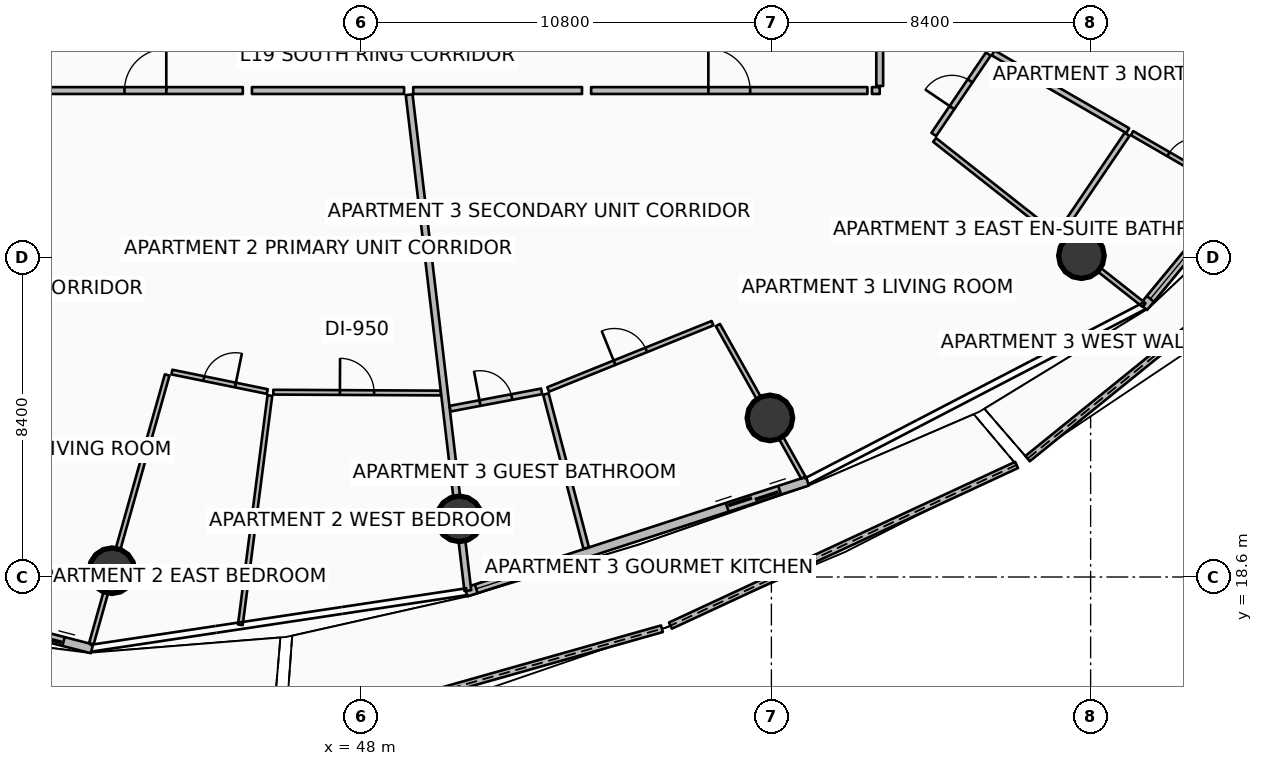
"""IFC4 building model, lengths in metres.
Left out: names, types, materials, properties, quantities, classifications, styles, units other than length and angle.
Written with IfcOpenShell. Run it as: python <this file> out.ifc"""

import sys

from ifc_helpers import new_model, si_unit, direction, frame, frame_2d, origin, origin_2d, place, context, subcontext, project, spatial, polyline, rectangle, circle, outline, extrude, element, fill, save


model = new_model("IFC4")
c1 = context("Model", 3, precision=1e-05, world=origin(), true_north=direction((0.0, 1.0)))
c2 = subcontext(c1, "Body", "Model", "MODEL_VIEW")
j1 = project(units=[si_unit("LENGTHUNIT", "METRE"), si_unit("PLANEANGLEUNIT", "RADIAN")], contexts=[c1])
p1 = place(None, origin())
s1 = spatial("IfcSite", under=j1, at=p1, CompositionType="ELEMENT")
p2 = place(p1, origin())
s2 = spatial("IfcBuilding", under=s1, at=p2, CompositionType="ELEMENT")
p3 = place(p2, frame((0.0, 0.0, 78.9)))
s3 = spatial("IfcBuildingStorey", under=s2, at=p3, CompositionType="ELEMENT", Elevation=78.9)
for number, where, z_axis, x_axis in (
    (1, (41.447, 18.766, 0.0), (0.0, 0.0, 1.0), (1.0, 0.0, 0.0)),
    (2, (50.588, 20.131, 0.0), (0.0, 0.0, 1.0), (1.0, 0.0, 0.0)),
    (3, (58.76, 22.786, 0.0), (0.0, 0.0, 1.0), (1.0, 0.0, 0.0)),
    (4, (66.958, 27.055, 0.0), (0.0, 0.0, 1.0), (1.0, 0.0, 0.0)),
):
    element("IfcColumn", number, at=place(p3, frame(where, z_axis=z_axis, x_axis=x_axis)), inside=s3, PredefinedType="COLUMN", context=c2, shape_type="SweptSolid", body=[
        extrude(circle(Radius=0.6, at=origin_2d()), origin(), (0.0, 0.0, 1.0), 3.5),
    ])
p4 = place(p3, frame((46.0, 14.436, 0.0), z_axis=(0.0, 0.0, 1.0), x_axis=(0.962322473133, 0.271910753195, 0.0)))
e5 = element("IfcWall", 5, at=p4, inside=s3, PredefinedType="PARAPET", context=c2, shape_type="SweptSolid", body=[
    extrude(outline(polyline([(0.0, 0.0), (10.308, 0.0), (10.308, 1.632), (5.154, 1.798), (0.0, 1.86), (0.0, 0.0)])), frame((0.0, 0.09, 0.0), z_axis=(0.0, -1.0, 0.0), x_axis=(1.0, 0.0, 0.0)), (0.0, 0.0, 1.0), 0.18),
])
p5 = place(p3, frame((56.144, 17.322, 0.0), z_axis=(0.0, 0.0, 1.0), x_axis=(0.907065674135, 0.420989148086, 0.0)))
e6 = element("IfcWall", 6, at=p5, inside=s3, PredefinedType="PARAPET", context=c2, shape_type="SweptSolid", body=[
    extrude(outline(polyline([(0.0, 0.0), (10.041, 0.0), (10.042, 1.233), (5.021, 1.418), (0.0, 1.632), (0.0, 0.0)])), frame((0.0, 0.09, 0.0), z_axis=(0.0, -1.0, 0.0), x_axis=(1.0, 0.0, 0.0)), (0.0, 0.0, 1.0), 0.18),
])
p6 = place(p3, frame((65.541, 21.715, 0.0), z_axis=(0.0, 0.0, 1.0), x_axis=(0.777242274281, 0.629201436005, 0.0)))
e7 = element("IfcWall", 7, at=p6, inside=s3, PredefinedType="PARAPET", context=c2, shape_type="SweptSolid", body=[
    extrude(outline(polyline([(0.0, 0.0), (10.949, 0.0), (10.949, 1.148), (5.474, 1.127), (0.0, 1.224), (0.0, 0.0)])), frame((0.0, 0.09, 0.0), z_axis=(0.0, -1.0, 0.0), x_axis=(1.0, 0.0, 0.0)), (0.0, 0.0, 1.0), 0.18),
])
p7 = place(p3, frame((30.186, 19.477, 0.0), z_axis=(0.0, 0.0, 1.0), x_axis=(0.968356180858, -0.249572248045, 0.0)))
e8 = element("IfcWall", 8, at=p7, inside=s3, PredefinedType="SOLIDWALL", context=c2, shape_type="SweptSolid", body=[
    extrude(rectangle(XDim=11.084, YDim=0.24, at=frame_2d((5.542, 0.0))), origin(), (0.0, 0.0, 1.0), 2.45),
])
p8 = place(p7, frame((8.865, 0.0, 0.0)))
e9 = element("IfcOpeningElement", 9, at=p8, cuts=e8, PredefinedType="OPENING", context=c2, shape_type="SweptSolid", body=[
    extrude(rectangle(XDim=1.45, YDim=2.15, at=frame_2d((0.725, 1.075))), frame((0.0, 0.13, 0.0), z_axis=(0.0, -1.0, 0.0), x_axis=(1.0, 0.0, 0.0)), (0.0, 0.0, 1.0), 0.26),
])
p9 = place(p7, frame((0.28, 0.0, 0.65)))
e10 = element("IfcOpeningElement", 10, at=p9, cuts=e8, PredefinedType="OPENING", context=c2, shape_type="SweptSolid", body=[
    extrude(rectangle(XDim=1.6, YDim=1.5, at=frame_2d((0.8, 0.75))), frame((0.0, 0.13, 0.0), z_axis=(0.0, -1.0, 0.0), x_axis=(1.0, 0.0, 0.0)), (0.0, 0.0, 1.0), 0.26),
])
p10 = place(p3, frame((50.767, 18.203, 0.0), z_axis=(0.0, 0.0, 1.0), x_axis=(0.951052494852, 0.30902937083, 0.0)))
e11 = element("IfcWall", 11, at=p10, inside=s3, PredefinedType="SOLIDWALL", context=c2, shape_type="SweptSolid", body=[
    extrude(rectangle(XDim=9.444, YDim=0.24, at=frame_2d((4.722, 0.0))), origin(), (0.0, 0.0, 1.0), 2.45),
])
p11 = place(p10, frame((7.224, 0.0, 0.0)))
e12 = element("IfcOpeningElement", 12, at=p11, cuts=e11, PredefinedType="OPENING", context=c2, shape_type="SweptSolid", body=[
    extrude(rectangle(XDim=1.45, YDim=2.15, at=frame_2d((0.725, 1.075))), frame((0.0, 0.13, 0.0), z_axis=(0.0, -1.0, 0.0), x_axis=(1.0, 0.0, 0.0)), (0.0, 0.0, 1.0), 0.26),
])
p12 = place(p10, frame((0.28, 0.0, 0.65)))
e13 = element("IfcOpeningElement", 13, at=p12, cuts=e11, PredefinedType="OPENING", context=c2, shape_type="SweptSolid", body=[
    extrude(rectangle(XDim=1.6, YDim=1.5, at=frame_2d((0.8, 0.75))), frame((0.0, 0.13, 0.0), z_axis=(0.0, -1.0, 0.0), x_axis=(1.0, 0.0, 0.0)), (0.0, 0.0, 1.0), 0.26),
])
p13 = place(p3, frame((68.593, 25.702, 0.0), z_axis=(0.0, 0.0, 1.0), x_axis=(0.636704975, 0.771107498868, 0.0)))
e14 = element("IfcWall", 14, at=p13, inside=s3, PredefinedType="SOLIDWALL", context=c2, shape_type="SweptSolid", body=[
    extrude(rectangle(XDim=11.084, YDim=0.24, at=frame_2d((5.542, 0.0))), origin(), (0.0, 0.0, 1.0), 2.45),
])
p14 = place(p13, frame((8.864, 0.0, 0.0)))
e15 = element("IfcOpeningElement", 15, at=p14, cuts=e14, PredefinedType="OPENING", context=c2, shape_type="SweptSolid", body=[
    extrude(rectangle(XDim=1.45, YDim=2.15, at=frame_2d((0.725, 1.075))), frame((0.0, 0.13, 0.0), z_axis=(0.0, -1.0, 0.0), x_axis=(1.0, 0.0, 0.0)), (0.0, 0.0, 1.0), 0.26),
])
p15 = place(p13, frame((0.28, 0.0, 0.65)))
e16 = element("IfcOpeningElement", 16, at=p15, cuts=e14, PredefinedType="OPENING", context=c2, shape_type="SweptSolid", body=[
    extrude(rectangle(XDim=1.6, YDim=1.5, at=frame_2d((0.8, 0.75))), frame((0.0, 0.13, 0.0), z_axis=(0.0, -1.0, 0.0), x_axis=(1.0, 0.0, 0.0)), (0.0, 0.0, 1.0), 0.26),
])
p16 = place(p3, frame((49.268, 31.291, 0.0), z_axis=(0.0, 0.0, 1.0), x_axis=(0.117532311618, -0.993069058891, 0.0)))
e17 = element("IfcWall", 17, at=p16, inside=s3, PredefinedType="PARTITIONING", context=c2, shape_type="SweptSolid", body=[
    extrude(rectangle(XDim=13.138, YDim=0.18, at=frame_2d((6.569, 0.0))), origin(), (0.0, 0.0, 1.0), 2.94),
])
p17 = place(p3, frame((39.764, 31.4, 0.0), z_axis=(0.0, 0.0, 1.0), x_axis=(1.0, 0.0, 0.0)))
e18 = element("IfcWall", 18, at=p17, inside=s3, PredefinedType="PARTITIONING", context=c2, shape_type="SweptSolid", body=[
    extrude(rectangle(XDim=5.127, YDim=0.18, at=frame_2d((2.563, 0.0))), origin(), (0.0, 0.0, 1.0), 2.94),
])
p18 = place(p17, frame((2.013, 0.0, 0.0)))
e19 = element("IfcOpeningElement", 19, at=p18, cuts=e18, PredefinedType="OPENING", context=c2, shape_type="SweptSolid", body=[
    extrude(rectangle(XDim=1.1, YDim=2.1, at=frame_2d((0.55, 1.05))), frame((0.0, 0.1, 0.0), z_axis=(0.0, -1.0, 0.0), x_axis=(1.0, 0.0, 0.0)), (0.0, 0.0, 1.0), 0.2),
])
p19 = place(p3, frame((45.131, 31.4, 0.0), z_axis=(0.0, 0.0, 1.0), x_axis=(1.0, 0.0, 0.0)))
e20 = element("IfcWall", 20, at=p19, inside=s3, PredefinedType="PARTITIONING", context=c2, shape_type="SweptSolid", body=[
    extrude(rectangle(XDim=4.004, YDim=0.18, at=frame_2d((2.002, 0.0))), origin(), (0.0, 0.0, 1.0), 2.94),
])
p20 = place(p3, frame((42.9, 23.917, 0.0), z_axis=(0.0, 0.0, 1.0), x_axis=(-0.27145069635, -0.962452346587, 0.0)))
e21 = element("IfcWall", 21, at=p20, inside=s3, PredefinedType="PARTITIONING", context=c2, shape_type="SweptSolid", body=[
    extrude(rectangle(XDim=7.349, YDim=0.125, at=frame_2d((3.674, 0.0))), origin(), (0.0, 0.0, 1.0), 2.94),
])
p21 = place(p3, frame((45.603, 23.375, 0.0), z_axis=(0.0, 0.0, 1.0), x_axis=(-0.127689849516, -0.991814147071, 0.0)))
e22 = element("IfcWall", 22, at=p21, inside=s3, PredefinedType="PARTITIONING", context=c2, shape_type="SweptSolid", body=[
    extrude(rectangle(XDim=6.082, YDim=0.125, at=frame_2d((3.041, 0.0))), origin(), (0.0, 0.0, 1.0), 2.94),
])
p22 = place(p3, frame((43.025, 23.993, 0.0), z_axis=(0.0, 0.0, 1.0), x_axis=(0.97978119615, -0.200072006215, 0.0)))
e23 = element("IfcWall", 23, at=p22, inside=s3, PredefinedType="PARTITIONING", context=c2, shape_type="SweptSolid", body=[
    extrude(rectangle(XDim=2.562, YDim=0.125, at=frame_2d((1.281, 0.0))), origin(), (0.0, 0.0, 1.0), 2.94),
])
p23 = place(p22, frame((0.856, 0.0, 0.0)))
e24 = element("IfcOpeningElement", 24, at=p23, cuts=e23, PredefinedType="OPENING", context=c2, shape_type="SweptSolid", body=[
    extrude(rectangle(XDim=0.85, YDim=2.06, at=frame_2d((0.425, 1.03))), frame((0.0, 0.073, 0.0), z_axis=(0.0, -1.0, 0.0), x_axis=(1.0, 0.0, 0.0)), (0.0, 0.0, 1.0), 0.145),
])
p24 = place(p3, frame((45.694, 23.463, 0.0), z_axis=(0.0, 0.0, 1.0), x_axis=(0.999986986287, -0.005101691496, 0.0)))
e25 = element("IfcWall", 25, at=p24, inside=s3, PredefinedType="PARTITIONING", context=c2, shape_type="SweptSolid", body=[
    extrude(rectangle(XDim=4.403, YDim=0.125, at=frame_2d((2.201, 0.0))), origin(), (0.0, 0.0, 1.0), 2.94),
])
p25 = place(p24, frame((1.751, 0.0, 0.0)))
e26 = element("IfcOpeningElement", 26, at=p25, cuts=e25, PredefinedType="OPENING", context=c2, shape_type="SweptSolid", body=[
    extrude(rectangle(XDim=0.9, YDim=2.08, at=frame_2d((0.45, 1.04))), frame((0.0, 0.073, 0.0), z_axis=(0.0, -1.0, 0.0), x_axis=(1.0, 0.0, 0.0)), (0.0, 0.0, 1.0), 0.145),
])
p26 = place(p3, frame((54.056, 31.4, 0.0), z_axis=(0.0, 0.0, 1.0), x_axis=(1.0, 0.0, 0.0)))
e27 = element("IfcWall", 27, at=p26, inside=s3, PredefinedType="PARTITIONING", context=c2, shape_type="SweptSolid", body=[
    extrude(rectangle(XDim=7.27, YDim=0.18, at=frame_2d((3.635, 0.0))), origin(), (0.0, 0.0, 1.0), 2.94),
])
p27 = place(p26, frame((3.085, 0.0, 0.0)))
e28 = element("IfcOpeningElement", 28, at=p27, cuts=e27, PredefinedType="OPENING", context=c2, shape_type="SweptSolid", body=[
    extrude(rectangle(XDim=1.1, YDim=2.1, at=frame_2d((0.55, 1.05))), frame((0.0, 0.1, 0.0), z_axis=(0.0, -1.0, 0.0), x_axis=(1.0, 0.0, 0.0)), (0.0, 0.0, 1.0), 0.2),
])
p28 = place(p3, frame((49.375, 31.4, 0.0), z_axis=(0.0, 0.0, 1.0), x_axis=(1.0, 0.0, 0.0)))
e29 = element("IfcWall", 29, at=p28, inside=s3, PredefinedType="PARTITIONING", context=c2, shape_type="SweptSolid", body=[
    extrude(rectangle(XDim=4.442, YDim=0.18, at=frame_2d((2.221, 0.0))), origin(), (0.0, 0.0, 1.0), 2.94),
])
p29 = place(p3, frame((57.392, 25.229, 0.0), z_axis=(0.0, 0.0, 1.0), x_axis=(0.488604984913, -0.872505110998, 0.0)))
e30 = element("IfcWall", 30, at=p29, inside=s3, PredefinedType="PARTITIONING", context=c2, shape_type="SweptSolid", body=[
    extrude(rectangle(XDim=4.6, YDim=0.125, at=frame_2d((2.3, 0.0))), origin(), (0.0, 0.0, 1.0), 2.94),
])
p30 = place(p3, frame((50.346, 23.029, 0.0), z_axis=(0.0, 0.0, 1.0), x_axis=(0.982576637083, 0.185857881885, 0.0)))
e31 = element("IfcWall", 31, at=p30, inside=s3, PredefinedType="PARTITIONING", context=c2, shape_type="SweptSolid", body=[
    extrude(rectangle(XDim=2.451, YDim=0.15, at=frame_2d((1.226, 0.0))), origin(), (0.0, 0.0, 1.0), 2.94),
])
p31 = place(p30, frame((0.801, 0.0, 0.0)))
e32 = element("IfcOpeningElement", 32, at=p31, cuts=e31, PredefinedType="OPENING", context=c2, shape_type="SweptSolid", body=[
    extrude(rectangle(XDim=0.85, YDim=2.06, at=frame_2d((0.425, 1.03))), frame((0.0, 0.085, 0.0), z_axis=(0.0, -1.0, 0.0), x_axis=(1.0, 0.0, 0.0)), (0.0, 0.0, 1.0), 0.17),
])
p32 = place(p3, frame((52.865, 23.414, 0.0), z_axis=(0.0, 0.0, 1.0), x_axis=(0.253228265637, -0.96740655646, 0.0)))
e33 = element("IfcWall", 33, at=p32, inside=s3, PredefinedType="PARTITIONING", context=c2, shape_type="SweptSolid", body=[
    extrude(rectangle(XDim=4.19, YDim=0.15, at=frame_2d((2.095, 0.0))), origin(), (0.0, 0.0, 1.0), 2.94),
])
p33 = place(p3, frame((52.926, 23.535, 0.0), z_axis=(0.0, 0.0, 1.0), x_axis=(0.927447622914, 0.373953080949, 0.0)))
e34 = element("IfcWall", 34, at=p33, inside=s3, PredefinedType="PARTITIONING", context=c2, shape_type="SweptSolid", body=[
    extrude(rectangle(XDim=4.663, YDim=0.125, at=frame_2d((2.332, 0.0))), origin(), (0.0, 0.0, 1.0), 2.94),
])
p34 = place(p33, frame((1.881, 0.0, 0.0)))
e35 = element("IfcOpeningElement", 35, at=p34, cuts=e34, PredefinedType="OPENING", context=c2, shape_type="SweptSolid", body=[
    extrude(rectangle(XDim=0.9, YDim=2.08, at=frame_2d((0.45, 1.04))), frame((0.0, 0.073, 0.0), z_axis=(0.0, -1.0, 0.0), x_axis=(1.0, 0.0, 0.0)), (0.0, 0.0, 1.0), 0.145),
])
p35 = place(p3, frame((61.446, 31.4, 0.0), z_axis=(0.0, 0.0, 1.0), x_axis=(1.0, 0.0, 0.0)))
e36 = element("IfcWall", 36, at=p35, inside=s3, PredefinedType="PARTITIONING", context=c2, shape_type="SweptSolid", body=[
    extrude(rectangle(XDim=0.204, YDim=0.18, at=frame_2d((0.102, 0.0))), origin(), (0.0, 0.0, 1.0), 2.94),
])
p36 = place(p3, frame((61.65, 31.52, 0.0), z_axis=(0.0, 0.0, 1.0), x_axis=(0.0, 1.0, 0.0)))
e37 = element("IfcWall", 37, at=p36, inside=s3, PredefinedType="PARTITIONING", context=c2, shape_type="SweptSolid", body=[
    extrude(rectangle(XDim=6.51, YDim=0.18, at=frame_2d((3.255, 0.0))), origin(), (0.0, 0.0, 1.0), 2.94),
])
p37 = place(p3, frame((63.095, 30.1, 0.0), z_axis=(0.0, 0.0, 1.0), x_axis=(0.78530300145, -0.6191116183, 0.0)))
e38 = element("IfcWall", 38, at=p37, inside=s3, PredefinedType="PARTITIONING", context=c2, shape_type="SweptSolid", body=[
    extrude(rectangle(XDim=7.016, YDim=0.125, at=frame_2d((3.508, 0.0))), origin(), (0.0, 0.0, 1.0), 2.94),
])
p38 = place(p3, frame((63.073, 30.244, 0.0), z_axis=(0.0, 0.0, 1.0), x_axis=(0.561076223922, 0.827764139685, 0.0)))
e39 = element("IfcWall", 39, at=p38, inside=s3, PredefinedType="PARTITIONING", context=c2, shape_type="SweptSolid", body=[
    extrude(rectangle(XDim=2.556, YDim=0.15, at=frame_2d((1.278, 0.0))), origin(), (0.0, 0.0, 1.0), 2.94),
])
p39 = place(p38, frame((0.853, 0.0, 0.0)))
e40 = element("IfcOpeningElement", 40, at=p39, cuts=e39, PredefinedType="OPENING", context=c2, shape_type="SweptSolid", body=[
    extrude(rectangle(XDim=0.85, YDim=2.06, at=frame_2d((0.425, 1.03))), frame((0.0, 0.085, 0.0), z_axis=(0.0, -1.0, 0.0), x_axis=(1.0, 0.0, 0.0)), (0.0, 0.0, 1.0), 0.17),
])
p40 = place(p3, frame((66.387, 27.632, 0.0), z_axis=(0.0, 0.0, 1.0), x_axis=(0.561080301856, 0.82776137556, 0.0)))
e41 = element("IfcWall", 41, at=p40, inside=s3, PredefinedType="PARTITIONING", context=c2, shape_type="SweptSolid", body=[
    extrude(rectangle(XDim=3.162, YDim=0.15, at=frame_2d((1.581, 0.0))), origin(), (0.0, 0.0, 1.0), 2.94),
])
p41 = place(p3, frame((64.635, 32.39, 0.0), z_axis=(0.0, 0.0, 1.0), x_axis=(0.865897249189, -0.500221904605, 0.0)))
e42 = element("IfcWall", 42, at=p41, inside=s3, PredefinedType="PARTITIONING", context=c2, shape_type="SweptSolid", body=[
    extrude(rectangle(XDim=4.09, YDim=0.15, at=frame_2d((2.045, 0.0))), origin(), (0.0, 0.0, 1.0), 2.94),
])
p42 = place(p3, frame((68.29, 30.279, 0.0), z_axis=(0.0, 0.0, 1.0), x_axis=(0.865901850726, -0.50021393914, 0.0)))
e43 = element("IfcWall", 43, at=p42, inside=s3, PredefinedType="PARTITIONING", context=c2, shape_type="SweptSolid", body=[
    extrude(rectangle(XDim=3.067, YDim=0.125, at=frame_2d((1.534, 0.0))), origin(), (0.0, 0.0, 1.0), 2.94),
])
p43 = place(p42, frame((1.108, 0.0, 0.0)))
e44 = element("IfcOpeningElement", 44, at=p43, cuts=e43, PredefinedType="OPENING", context=c2, shape_type="SweptSolid", body=[
    extrude(rectangle(XDim=0.85, YDim=2.06, at=frame_2d((0.425, 1.03))), frame((0.0, 0.073, 0.0), z_axis=(0.0, -1.0, 0.0), x_axis=(1.0, 0.0, 0.0)), (0.0, 0.0, 1.0), 0.145),
])
p44 = place(p3, frame((65.764, 34.684, 0.0), z_axis=(0.0, 0.0, 1.0), x_axis=(0.924663817091, -0.380784486767, 0.0)))
e45 = element("IfcWall", 45, at=p44, inside=s3, PredefinedType="PARTITIONING", context=c2, shape_type="SweptSolid", body=[
    extrude(rectangle(XDim=8.143, YDim=0.125, at=frame_2d((4.072, 0.0))), origin(), (0.0, 0.0, 1.0), 2.94),
])
p45 = place(p8, origin())
e46 = element("IfcDoor", 46, at=p45, inside=s3, OperationType="DOUBLE_DOOR_SLIDING", PredefinedType="DOOR", context=c2, shape_type="SweptSolid", body=[
    extrude(rectangle(XDim=1.45, YDim=2.15, at=frame_2d((0.725, 1.075))), frame((0.0, 0.025, 0.0), z_axis=(0.0, -1.0, 0.0), x_axis=(1.0, 0.0, 0.0)), (0.0, 0.0, 1.0), 0.05),
])
fill(e9, e46)
p46 = place(p11, origin())
e47 = element("IfcDoor", 47, at=p46, inside=s3, OperationType="DOUBLE_DOOR_SLIDING", PredefinedType="DOOR", context=c2, shape_type="SweptSolid", body=[
    extrude(rectangle(XDim=1.45, YDim=2.15, at=frame_2d((0.725, 1.075))), frame((0.0, 0.025, 0.0), z_axis=(0.0, -1.0, 0.0), x_axis=(1.0, 0.0, 0.0)), (0.0, 0.0, 1.0), 0.05),
])
fill(e12, e47)
p47 = place(p12, origin())
e48 = element("IfcWindow", 48, at=p47, inside=s3, PartitioningType="SINGLE_PANEL", PredefinedType="WINDOW", context=c2, shape_type="SweptSolid", body=[
    extrude(rectangle(XDim=1.6, YDim=1.5, at=frame_2d((0.8, 0.75))), frame((0.0, 0.03, 0.0), z_axis=(0.0, -1.0, 0.0), x_axis=(1.0, 0.0, 0.0)), (0.0, 0.0, 1.0), 0.06),
])
fill(e13, e48)
p48 = place(p15, origin())
e49 = element("IfcWindow", 49, at=p48, inside=s3, PartitioningType="SINGLE_PANEL", PredefinedType="WINDOW", context=c2, shape_type="SweptSolid", body=[
    extrude(rectangle(XDim=1.6, YDim=1.5, at=frame_2d((0.8, 0.75))), frame((0.0, 0.03, 0.0), z_axis=(0.0, -1.0, 0.0), x_axis=(1.0, 0.0, 0.0)), (0.0, 0.0, 1.0), 0.06),
])
fill(e16, e49)
p49 = place(p18, origin())
e50 = element("IfcDoor", 50, at=p49, inside=s3, OperationType="SINGLE_SWING_RIGHT", PredefinedType="DOOR", context=c2, shape_type="SweptSolid", body=[
    extrude(rectangle(XDim=1.1, YDim=2.1, at=frame_2d((0.55, 1.05))), frame((0.0, 0.025, 0.0), z_axis=(0.0, -1.0, 0.0), x_axis=(1.0, 0.0, 0.0)), (0.0, 0.0, 1.0), 0.05),
])
fill(e19, e50)
p50 = place(p23, origin())
e51 = element("IfcDoor", 51, at=p50, inside=s3, OperationType="SINGLE_SWING_RIGHT", PredefinedType="DOOR", context=c2, shape_type="SweptSolid", body=[
    extrude(rectangle(XDim=0.85, YDim=2.06, at=frame_2d((0.425, 1.03))), frame((0.0, 0.025, 0.0), z_axis=(0.0, -1.0, 0.0), x_axis=(1.0, 0.0, 0.0)), (0.0, 0.0, 1.0), 0.05),
])
fill(e24, e51)
p51 = place(p25, origin())
e52 = element("IfcDoor", 52, at=p51, inside=s3, OperationType="SINGLE_SWING_LEFT", PredefinedType="DOOR", context=c2, shape_type="SweptSolid", body=[
    extrude(rectangle(XDim=0.9, YDim=2.08, at=frame_2d((0.45, 1.04))), frame((0.0, 0.025, 0.0), z_axis=(0.0, -1.0, 0.0), x_axis=(1.0, 0.0, 0.0)), (0.0, 0.0, 1.0), 0.05),
])
fill(e26, e52)
p52 = place(p27, origin())
e53 = element("IfcDoor", 53, at=p52, inside=s3, OperationType="SINGLE_SWING_LEFT", PredefinedType="DOOR", context=c2, shape_type="SweptSolid", body=[
    extrude(rectangle(XDim=1.1, YDim=2.1, at=frame_2d((0.55, 1.05))), frame((0.0, 0.025, 0.0), z_axis=(0.0, -1.0, 0.0), x_axis=(1.0, 0.0, 0.0)), (0.0, 0.0, 1.0), 0.05),
])
fill(e28, e53)
p53 = place(p31, origin())
e54 = element("IfcDoor", 54, at=p53, inside=s3, OperationType="SINGLE_SWING_LEFT", PredefinedType="DOOR", context=c2, shape_type="SweptSolid", body=[
    extrude(rectangle(XDim=0.85, YDim=2.06, at=frame_2d((0.425, 1.03))), frame((0.0, 0.025, 0.0), z_axis=(0.0, -1.0, 0.0), x_axis=(1.0, 0.0, 0.0)), (0.0, 0.0, 1.0), 0.05),
])
fill(e32, e54)
p54 = place(p34, origin())
e55 = element("IfcDoor", 55, at=p54, inside=s3, OperationType="SINGLE_SWING_LEFT", PredefinedType="DOOR", context=c2, shape_type="SweptSolid", body=[
    extrude(rectangle(XDim=0.9, YDim=2.08, at=frame_2d((0.45, 1.04))), frame((0.0, 0.025, 0.0), z_axis=(0.0, -1.0, 0.0), x_axis=(1.0, 0.0, 0.0)), (0.0, 0.0, 1.0), 0.05),
])
fill(e35, e55)
p55 = place(p39, origin())
e56 = element("IfcDoor", 56, at=p55, inside=s3, OperationType="SINGLE_SWING_LEFT", PredefinedType="DOOR", context=c2, shape_type="SweptSolid", body=[
    extrude(rectangle(XDim=0.85, YDim=2.06, at=frame_2d((0.425, 1.03))), frame((0.0, 0.025, 0.0), z_axis=(0.0, -1.0, 0.0), x_axis=(1.0, 0.0, 0.0)), (0.0, 0.0, 1.0), 0.05),
])
fill(e40, e56)
p56 = place(p43, origin())
e57 = element("IfcDoor", 57, at=p56, inside=s3, OperationType="SINGLE_SWING_RIGHT", PredefinedType="DOOR", context=c2, shape_type="SweptSolid", body=[
    extrude(rectangle(XDim=0.85, YDim=2.06, at=frame_2d((0.425, 1.03))), frame((0.0, 0.025, 0.0), z_axis=(0.0, -1.0, 0.0), x_axis=(1.0, 0.0, 0.0)), (0.0, 0.0, 1.0), 0.05),
])
fill(e44, e57)
save(model, sys.argv[1])
